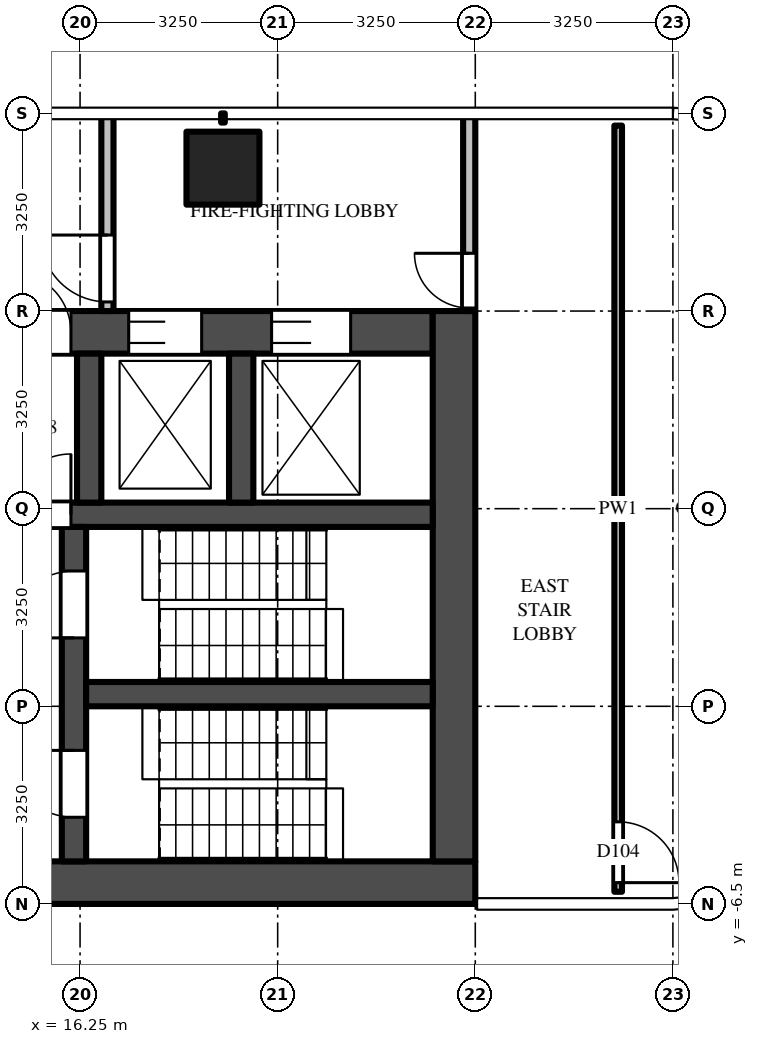
"""IFC4 building model, lengths in metres.
Left out: names, types, materials, properties, quantities, classifications, styles, units other than length and angle.
Written with IfcOpenShell. Run it as: python <this file> out.ifc"""

import sys

from ifc_helpers import new_model, si_unit, direction, frame, frame_2d, origin, origin_2d, place, context, subcontext, project, spatial, rectangle, extrude, source, transform, mapped, element, fill, save


model = new_model("IFC4")
c1 = context("Model", 3, precision=1e-05, world=origin(), true_north=direction((0.0, 1.0)))
c2 = subcontext(c1, "Body", "Model", "MODEL_VIEW")
j1 = project(units=[si_unit("LENGTHUNIT", "METRE"), si_unit("PLANEANGLEUNIT", "RADIAN")], contexts=[c1])
p1 = place(None, origin())
s1 = spatial("IfcSite", under=j1, at=p1, CompositionType="ELEMENT")
p2 = place(p1, origin())
s2 = spatial("IfcBuilding", under=s1, at=p2, CompositionType="ELEMENT")
p3 = place(p2, frame((0.0, 0.0, 165.9)))
s3 = spatial("IfcBuildingStorey", under=s2, at=p3, CompositionType="ELEMENT", Elevation=165.9)
m1 = source(origin(), c2, "Body", "SweptSolid", [
    extrude(rectangle(XDim=1.2, YDim=1.2, at=origin_2d()), origin(), (0.0, 0.0, 1.0), 3.9),
])
p4 = place(p3, frame((18.6, 5.6, 0.0), z_axis=(0.0, 0.0, 1.0), x_axis=(1.0, 0.0, 0.0)))
e1 = element("IfcColumn", 1, at=p4, inside=s3, PredefinedType="COLUMN", context=c2, shape_type="MappedRepresentation", body=[
    mapped(m1, transform((0.0, 0.0, 0.0))),
])
m2 = source(origin(), c2, "Body", "SweptSolid", [
    extrude(rectangle(XDim=16.55, YDim=0.7, at=frame_2d((8.275, 0.0))), origin(), (0.0, 0.0, 1.0), 3.7),
])
p5 = place(p3, frame((6.2, -6.15, 0.0), z_axis=(0.0, 0.0, 1.0), x_axis=(1.0, 0.0, 0.0)))
e2 = element("IfcWall", 2, at=p5, inside=s3, PredefinedType="SHEAR", context=c2, shape_type="MappedRepresentation", body=[
    mapped(m2, transform((0.0, 0.0, 0.0))),
])
m3 = source(origin(), c2, "Body", "SweptSolid", [
    extrude(rectangle(XDim=14.85, YDim=0.7, at=frame_2d((7.425, 0.0))), origin(), (0.0, 0.0, 1.0), 3.7),
])
p6 = place(p3, frame((7.2, 2.9, 0.0), z_axis=(0.0, 0.0, 1.0), x_axis=(1.0, 0.0, 0.0)))
e3 = element("IfcWall", 3, at=p6, inside=s3, PredefinedType="SHEAR", context=c2, shape_type="MappedRepresentation", body=[
    mapped(m3, transform((0.0, 0.0, 0.0))),
])
m4 = source(origin(), c2, "Body", "SweptSolid", [
    extrude(rectangle(XDim=1.1, YDim=2.1, at=frame_2d((0.55, 1.05))), frame((0.0, 0.36, 0.0), z_axis=(0.0, -1.0, 0.0), x_axis=(1.0, 0.0, 0.0)), (0.0, 0.0, 1.0), 0.72),
])
p7 = place(p6, frame((0.55, 0.0, 0.0)))
e4 = element("IfcOpeningElement", 4, at=p7, cuts=e3, PredefinedType="OPENING", context=c2, shape_type="MappedRepresentation", body=[
    mapped(m4, transform((0.0, 0.0, 0.0))),
])
p8 = place(p6, frame((3.15, 0.0, 0.0)))
e5 = element("IfcOpeningElement", 5, at=p8, cuts=e3, PredefinedType="OPENING", context=c2, shape_type="MappedRepresentation", body=[
    mapped(m4, transform((0.0, 0.0, 0.0))),
])
m5 = source(origin(), c2, "Body", "SweptSolid", [
    extrude(rectangle(XDim=1.2, YDim=2.1, at=frame_2d((0.6, 1.05))), frame((0.0, 0.36, 0.0), z_axis=(0.0, -1.0, 0.0), x_axis=(1.0, 0.0, 0.0)), (0.0, 0.0, 1.0), 0.72),
])
p9 = place(p6, frame((5.7, 0.0, 0.0)))
e6 = element("IfcOpeningElement", 6, at=p9, cuts=e3, PredefinedType="OPENING", context=c2, shape_type="MappedRepresentation", body=[
    mapped(m5, transform((0.0, 0.0, 0.0))),
])
m6 = source(origin(), c2, "Body", "SweptSolid", [
    extrude(rectangle(XDim=1.3, YDim=2.1, at=frame_2d((0.65, 1.05))), frame((0.0, 0.36, 0.0), z_axis=(0.0, -1.0, 0.0), x_axis=(1.0, 0.0, 0.0)), (0.0, 0.0, 1.0), 0.72),
])
p10 = place(p6, frame((12.2, 0.0, 0.0)))
e7 = element("IfcOpeningElement", 7, at=p10, cuts=e3, PredefinedType="OPENING", context=c2, shape_type="MappedRepresentation", body=[
    mapped(m6, transform((0.0, 0.0, 0.0))),
])
p11 = place(p6, frame((9.85, 0.0, 0.0)))
e8 = element("IfcOpeningElement", 8, at=p11, cuts=e3, PredefinedType="OPENING", context=c2, shape_type="MappedRepresentation", body=[
    mapped(m5, transform((0.0, 0.0, 0.0))),
])
m7 = source(origin(), c2, "Body", "SweptSolid", [
    extrude(rectangle(XDim=1.0, YDim=2.1, at=frame_2d((0.5, 1.05))), frame((0.0, 0.36, 0.0), z_axis=(0.0, -1.0, 0.0), x_axis=(1.0, 0.0, 0.0)), (0.0, 0.0, 1.0), 0.72),
])
p12 = place(p6, frame((7.9, 0.0, 0.0)))
e9 = element("IfcOpeningElement", 9, at=p12, cuts=e3, PredefinedType="OPENING", context=c2, shape_type="MappedRepresentation", body=[
    mapped(m7, transform((0.0, 0.0, 0.0))),
])
m8 = source(origin(), c2, "Body", "SweptSolid", [
    extrude(rectangle(XDim=9.05, YDim=0.7, at=frame_2d((4.525, 0.0))), origin(), (0.0, 0.0, 1.0), 3.7),
])
p13 = place(p3, frame((22.4, -5.8, 0.0), z_axis=(0.0, 0.0, 1.0), x_axis=(0.0, 1.0, 0.0)))
e10 = element("IfcWall", 10, at=p13, inside=s3, PredefinedType="SHEAR", context=c2, shape_type="MappedRepresentation", body=[
    mapped(m8, transform((0.0, 0.0, 0.0))),
])
m9 = source(origin(), c2, "Body", "SweptSolid", [
    extrude(rectangle(XDim=14.85, YDim=0.4, at=frame_2d((7.425, 0.0))), origin(), (0.0, 0.0, 1.0), 3.7),
])
p14 = place(p3, frame((7.2, -0.1, 0.0), z_axis=(0.0, 0.0, 1.0), x_axis=(1.0, 0.0, 0.0)))
e11 = element("IfcWall", 11, at=p14, inside=s3, PredefinedType="SHEAR", context=c2, shape_type="MappedRepresentation", body=[
    mapped(m9, transform((0.0, 0.0, 0.0))),
])
m10 = source(origin(), c2, "Body", "SweptSolid", [
    extrude(rectangle(XDim=1.0, YDim=2.1, at=frame_2d((0.5, 1.05))), frame((0.0, 0.21, 0.0), z_axis=(0.0, -1.0, 0.0), x_axis=(1.0, 0.0, 0.0)), (0.0, 0.0, 1.0), 0.42),
])
p15 = place(p14, frame((7.9, 0.0, 0.0)))
e12 = element("IfcOpeningElement", 12, at=p15, cuts=e11, PredefinedType="OPENING", context=c2, shape_type="MappedRepresentation", body=[
    mapped(m10, transform((0.0, 0.0, 0.0))),
])
m11 = source(origin(), c2, "Body", "SweptSolid", [
    extrude(rectangle(XDim=5.5, YDim=0.4, at=frame_2d((2.75, 0.0))), origin(), (0.0, 0.0, 1.0), 3.7),
])
p16 = place(p3, frame((16.15, -5.8, 0.0), z_axis=(0.0, 0.0, 1.0), x_axis=(0.0, 1.0, 0.0)))
e13 = element("IfcWall", 13, at=p16, inside=s3, PredefinedType="SHEAR", context=c2, shape_type="MappedRepresentation", body=[
    mapped(m11, transform((0.0, 0.0, 0.0))),
])
m12 = source(origin(), c2, "Body", "SweptSolid", [
    extrude(rectangle(XDim=1.1, YDim=2.1, at=frame_2d((0.55, 1.05))), frame((0.0, 0.21, 0.0), z_axis=(0.0, -1.0, 0.0), x_axis=(1.0, 0.0, 0.0)), (0.0, 0.0, 1.0), 0.42),
])
p17 = place(p16, frame((0.725, 0.0, 0.0)))
e14 = element("IfcOpeningElement", 14, at=p17, cuts=e13, PredefinedType="OPENING", context=c2, shape_type="MappedRepresentation", body=[
    mapped(m12, transform((0.0, 0.0, 0.0))),
])
p18 = place(p16, frame((3.675, 0.0, 0.0)))
e15 = element("IfcOpeningElement", 15, at=p18, cuts=e13, PredefinedType="OPENING", context=c2, shape_type="MappedRepresentation", body=[
    mapped(m12, transform((0.0, 0.0, 0.0))),
])
m13 = source(origin(), c2, "Body", "SweptSolid", [
    extrude(rectangle(XDim=5.7, YDim=0.4, at=frame_2d((2.85, 0.0))), origin(), (0.0, 0.0, 1.0), 3.7),
])
p19 = place(p3, frame((16.35, -3.05, 0.0), z_axis=(0.0, 0.0, 1.0), x_axis=(1.0, 0.0, 0.0)))
e16 = element("IfcWall", 16, at=p19, inside=s3, PredefinedType="SHEAR", context=c2, shape_type="MappedRepresentation", body=[
    mapped(m13, transform((0.0, 0.0, 0.0))),
])
m14 = source(origin(), c2, "Body", "SweptSolid", [
    extrude(rectangle(XDim=2.45, YDim=0.4, at=frame_2d((1.225, 0.0))), origin(), (0.0, 0.0, 1.0), 3.7),
])
for number, where, z_axis, x_axis in (
    (17, (16.4, 0.1, 0.0), (0.0, 0.0, 1.0), (0.0, 1.0, 0.0)),
    (18, (18.9, 0.1, 0.0), (0.0, 0.0, 1.0), (0.0, 1.0, 0.0)),
):
    element("IfcWall", number, at=place(p3, frame(where, z_axis=z_axis, x_axis=x_axis)), inside=s3, PredefinedType="SHEAR", context=c2, shape_type="MappedRepresentation", body=[
        mapped(m14, transform((0.0, 0.0, 0.0))),
    ])
m15 = source(origin(), c2, "Body", "SweptSolid", [
    extrude(rectangle(XDim=3.25, YDim=0.2, at=frame_2d((1.625, 0.0))), origin(), (0.0, 0.0, 1.0), 3.7),
])
p20 = place(p3, frame((16.7, 3.25, 0.0), z_axis=(0.0, 0.0, 1.0), x_axis=(0.0, 1.0, 0.0)))
e19 = element("IfcWall", 19, at=p20, inside=s3, PredefinedType="PARTITIONING", context=c2, shape_type="MappedRepresentation", body=[
    mapped(m15, transform((0.0, 0.0, 0.0))),
])
m16 = source(origin(), c2, "Body", "SweptSolid", [
    extrude(rectangle(XDim=1.1, YDim=2.1, at=frame_2d((0.55, 1.05))), frame((0.0, 0.11, 0.0), z_axis=(0.0, -1.0, 0.0), x_axis=(1.0, 0.0, 0.0)), (0.0, 0.0, 1.0), 0.22),
])
p21 = place(p20, frame((0.15, 0.0, 0.0)))
e20 = element("IfcOpeningElement", 20, at=p21, cuts=e19, PredefinedType="OPENING", context=c2, shape_type="MappedRepresentation", body=[
    mapped(m16, transform((0.0, 0.0, 0.0))),
])
p22 = place(p3, frame((22.65, 3.25, 0.0), z_axis=(0.0, 0.0, 1.0), x_axis=(0.0, 1.0, 0.0)))
e21 = element("IfcWall", 21, at=p22, inside=s3, PredefinedType="PARTITIONING", context=c2, shape_type="MappedRepresentation", body=[
    mapped(m15, transform((0.0, 0.0, 0.0))),
])
m17 = source(origin(), c2, "Body", "SweptSolid", [
    extrude(rectangle(XDim=0.9, YDim=2.1, at=frame_2d((0.45, 1.05))), frame((0.0, 0.11, 0.0), z_axis=(0.0, -1.0, 0.0), x_axis=(1.0, 0.0, 0.0)), (0.0, 0.0, 1.0), 0.22),
])
p23 = place(p22, frame((0.05, 0.0, 0.0)))
e22 = element("IfcOpeningElement", 22, at=p23, cuts=e21, PredefinedType="OPENING", context=c2, shape_type="MappedRepresentation", body=[
    mapped(m17, transform((0.0, 0.0, 0.0))),
])
m18 = source(origin(), c2, "Body", "SweptSolid", [
    extrude(rectangle(XDim=12.6, YDim=0.125, at=frame_2d((6.3, 0.0))), origin(), (0.0, 0.0, 1.0), 2.78),
])
p24 = place(p3, frame((25.1, 6.3, 0.0), z_axis=(0.0, 0.0, 1.0), x_axis=(0.0, -1.0, 0.0)))
e23 = element("IfcWall", 23, at=p24, inside=s3, PredefinedType="PARTITIONING", context=c2, shape_type="MappedRepresentation", body=[
    mapped(m18, transform((0.0, 0.0, 0.0))),
])
m19 = source(origin(), c2, "Body", "SweptSolid", [
    extrude(rectangle(XDim=1.0, YDim=2.1, at=frame_2d((0.5, 1.05))), frame((0.0, 0.073, 0.0), z_axis=(0.0, -1.0, 0.0), x_axis=(1.0, 0.0, 0.0)), (0.0, 0.0, 1.0), 0.145),
])
p25 = place(p24, frame((11.45, 0.0, 0.0)))
e24 = element("IfcOpeningElement", 24, at=p25, cuts=e23, PredefinedType="OPENING", context=c2, shape_type="MappedRepresentation", body=[
    mapped(m19, transform((0.0, 0.0, 0.0))),
])
m20 = source(origin(), c2, "Body", "SweptSolid", [
    extrude(rectangle(XDim=1.3, YDim=2.1, at=frame_2d((0.65, 1.05))), frame((0.0, -0.275, 0.0), z_axis=(0.0, -1.0, 0.0), x_axis=(1.0, 0.0, 0.0)), (0.0, 0.0, 1.0), 0.05),
])
p26 = place(p10, origin())
e25 = element("IfcDoor", 25, at=p26, inside=s3, OperationType="DOUBLE_DOOR_SLIDING", PredefinedType="DOOR", context=c2, shape_type="MappedRepresentation", body=[
    mapped(m20, transform((0.0, 0.0, 0.0))),
])
fill(e7, e25)
m21 = source(origin(), c2, "Body", "SweptSolid", [
    extrude(rectangle(XDim=1.2, YDim=2.1, at=frame_2d((0.6, 1.05))), frame((0.0, -0.275, 0.0), z_axis=(0.0, -1.0, 0.0), x_axis=(1.0, 0.0, 0.0)), (0.0, 0.0, 1.0), 0.05),
])
p27 = place(p11, origin())
e26 = element("IfcDoor", 26, at=p27, inside=s3, OperationType="DOUBLE_DOOR_SLIDING", PredefinedType="DOOR", context=c2, shape_type="MappedRepresentation", body=[
    mapped(m21, transform((0.0, 0.0, 0.0))),
])
fill(e8, e26)
m22 = source(origin(), c2, "Body", "SweptSolid", [
    extrude(rectangle(XDim=1.1, YDim=2.1, at=frame_2d((0.55, 1.05))), frame((0.0, 0.025, 0.0), z_axis=(0.0, -1.0, 0.0), x_axis=(1.0, 0.0, 0.0)), (0.0, 0.0, 1.0), 0.05),
])
p28 = place(p17, origin())
e27 = element("IfcDoor", 27, at=p28, inside=s3, OperationType="SINGLE_SWING_RIGHT", PredefinedType="DOOR", context=c2, shape_type="MappedRepresentation", body=[
    mapped(m22, transform((0.0, 0.0, 0.0))),
])
fill(e14, e27)
p29 = place(p18, origin())
e28 = element("IfcDoor", 28, at=p29, inside=s3, OperationType="SINGLE_SWING_LEFT", PredefinedType="DOOR", context=c2, shape_type="MappedRepresentation", body=[
    mapped(m22, transform((0.0, 0.0, 0.0))),
])
fill(e15, e28)
m23 = source(origin(), c2, "Body", "SweptSolid", [
    extrude(rectangle(XDim=1.0, YDim=2.1, at=frame_2d((0.5, 1.05))), frame((0.0, 0.025, 0.0), z_axis=(0.0, -1.0, 0.0), x_axis=(1.0, 0.0, 0.0)), (0.0, 0.0, 1.0), 0.05),
])
p30 = place(p15, origin())
e29 = element("IfcDoor", 29, at=p30, inside=s3, OperationType="SINGLE_SWING_RIGHT", PredefinedType="DOOR", context=c2, shape_type="MappedRepresentation", body=[
    mapped(m23, transform((0.0, 0.0, 0.0))),
])
fill(e12, e29)
m24 = source(origin(), c2, "Body", "SweptSolid", [
    extrude(rectangle(XDim=1.0, YDim=2.1, at=frame_2d((0.5, 1.05))), frame((0.0, -0.275, 0.0), z_axis=(0.0, -1.0, 0.0), x_axis=(1.0, 0.0, 0.0)), (0.0, 0.0, 1.0), 0.05),
])
p31 = place(p12, origin())
e30 = element("IfcDoor", 30, at=p31, inside=s3, OperationType="SINGLE_SWING_LEFT", PredefinedType="DOOR", context=c2, shape_type="MappedRepresentation", body=[
    mapped(m24, transform((0.0, 0.0, 0.0))),
])
fill(e9, e30)
p32 = place(p21, origin())
e31 = element("IfcDoor", 31, at=p32, inside=s3, OperationType="SINGLE_SWING_RIGHT", PredefinedType="DOOR", context=c2, shape_type="MappedRepresentation", body=[
    mapped(m22, transform((0.0, 0.0, 0.0))),
])
fill(e20, e31)
m25 = source(origin(), c2, "Body", "SweptSolid", [
    extrude(rectangle(XDim=0.9, YDim=2.1, at=frame_2d((0.45, 1.05))), frame((0.0, 0.025, 0.0), z_axis=(0.0, -1.0, 0.0), x_axis=(1.0, 0.0, 0.0)), (0.0, 0.0, 1.0), 0.05),
])
p33 = place(p23, origin())
e32 = element("IfcDoor", 32, at=p33, inside=s3, OperationType="SINGLE_SWING_RIGHT", PredefinedType="DOOR", context=c2, shape_type="MappedRepresentation", body=[
    mapped(m25, transform((0.0, 0.0, 0.0))),
])
fill(e22, e32)
p34 = place(p25, origin())
e33 = element("IfcDoor", 33, at=p34, inside=s3, OperationType="SINGLE_SWING_RIGHT", PredefinedType="DOOR", context=c2, shape_type="MappedRepresentation", body=[
    mapped(m23, transform((0.0, 0.0, 0.0))),
])
fill(e24, e33)
save(model, sys.argv[1])
